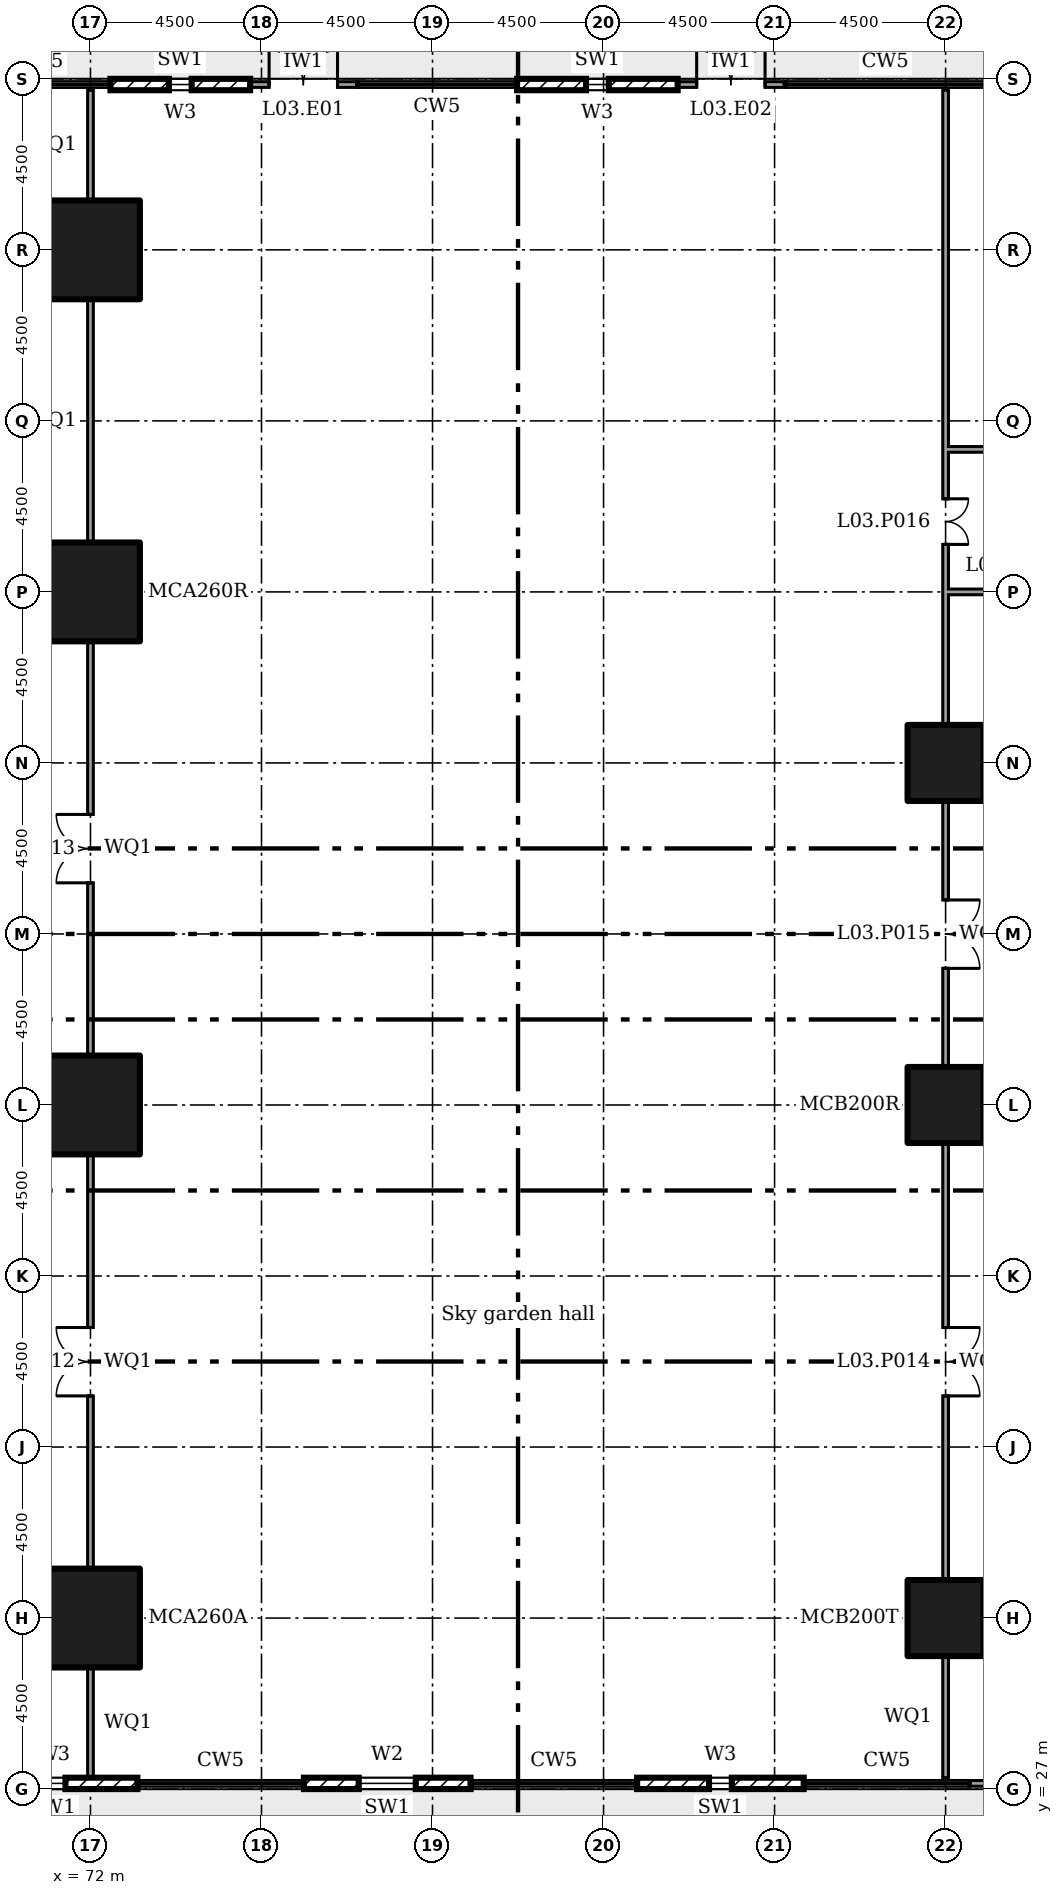
"""IFC4 building model, lengths in metres.
Left out: names, types, materials, properties, quantities, classifications, styles, units other than length and angle.
Written with IfcOpenShell. Run it as: python <this file> out.ifc"""

import sys

from ifc_helpers import new_model, si_unit, direction, frame, frame_2d, origin, origin_2d, place, context, subcontext, project, spatial, rectangle, extrude, element, fill, save


model = new_model("IFC4")
c1 = context("Model", 3, precision=1e-05, world=origin(), true_north=direction((0.0, 1.0)))
c2 = subcontext(c1, "Body", "Model", "MODEL_VIEW")
j1 = project(units=[si_unit("LENGTHUNIT", "METRE"), si_unit("PLANEANGLEUNIT", "RADIAN")], contexts=[c1])
p1 = place(None, origin())
s1 = spatial("IfcSite", under=j1, at=p1, CompositionType="ELEMENT")
p2 = place(p1, origin())
s2 = spatial("IfcBuilding", under=s1, at=p2, CompositionType="ELEMENT")
p3 = place(p2, frame((0.0, 0.0, 16.5)))
s3 = spatial("IfcBuildingStorey", under=s2, at=p3, CompositionType="ELEMENT", Elevation=16.5)
for number, where in (
    (1, (72.0, 31.5, 0.0)),
    (2, (72.0, 45.0, 0.0)),
    (3, (72.0, 58.5, 0.0)),
    (4, (72.0, 67.5, 0.0)),
):
    element("IfcColumn", number, at=place(p3, frame(where)), inside=s3, PredefinedType="COLUMN", context=c2, shape_type="SweptSolid", body=[
        extrude(rectangle(XDim=2.6, YDim=2.6, at=origin_2d()), origin(), (0.0, 0.0, 1.0), 4.5),
    ])
for number, where in (
    (5, (94.5, 31.5, 0.0)),
    (6, (94.5, 45.0, 0.0)),
    (7, (94.5, 54.0, 0.0)),
):
    element("IfcColumn", number, at=place(p3, frame(where)), inside=s3, PredefinedType="COLUMN", context=c2, shape_type="SweptSolid", body=[
        extrude(rectangle(XDim=2.0, YDim=2.0, at=origin_2d()), origin(), (0.0, 0.0, 1.0), 4.5),
    ])
p4 = place(p3, frame((68.8, 27.15, 0.0)))
e8 = element("IfcWall", 8, at=p4, inside=s3, PredefinedType="ELEMENTEDWALL", context=c2, shape_type="SweptSolid", body=[
    extrude(rectangle(XDim=4.433, YDim=0.3, at=frame_2d((2.217, 0.0))), origin(), (0.0, 0.0, 1.0), 4.05),
])
p5 = place(p4, frame((1.942, 0.0, 0.45)))
e9 = element("IfcOpeningElement", 9, at=p5, cuts=e8, PredefinedType="OPENING", context=c2, shape_type="SweptSolid", body=[
    extrude(rectangle(XDim=0.6, YDim=2.4, at=frame_2d((0.3, 1.2))), frame((0.0, 0.16, 0.0), z_axis=(0.0, -1.0, 0.0), x_axis=(1.0, 0.0, 0.0)), (0.0, 0.0, 1.0), 0.32),
])
p6 = place(p3, frame((77.617, 27.15, 0.0)))
e10 = element("IfcWall", 10, at=p6, inside=s3, PredefinedType="ELEMENTEDWALL", context=c2, shape_type="SweptSolid", body=[
    extrude(rectangle(XDim=4.383, YDim=0.3, at=frame_2d((2.192, 0.0))), origin(), (0.0, 0.0, 1.0), 4.05),
])
p7 = place(p6, frame((1.442, 0.0, 0.9)))
e11 = element("IfcOpeningElement", 11, at=p7, cuts=e10, PredefinedType="OPENING", context=c2, shape_type="SweptSolid", body=[
    extrude(rectangle(XDim=1.5, YDim=1.8, at=frame_2d((0.75, 0.9))), frame((0.0, 0.16, 0.0), z_axis=(0.0, -1.0, 0.0), x_axis=(1.0, 0.0, 0.0)), (0.0, 0.0, 1.0), 0.32),
])
p8 = place(p3, frame((86.383, 27.15, 0.0)))
e12 = element("IfcWall", 12, at=p8, inside=s3, PredefinedType="ELEMENTEDWALL", context=c2, shape_type="SweptSolid", body=[
    extrude(rectangle(XDim=4.383, YDim=0.3, at=frame_2d((2.192, 0.0))), origin(), (0.0, 0.0, 1.0), 4.05),
])
p9 = place(p8, frame((1.892, 0.0, 0.45)))
e13 = element("IfcOpeningElement", 13, at=p9, cuts=e12, PredefinedType="OPENING", context=c2, shape_type="SweptSolid", body=[
    extrude(rectangle(XDim=0.6, YDim=2.4, at=frame_2d((0.3, 1.2))), frame((0.0, 0.16, 0.0), z_axis=(0.0, -1.0, 0.0), x_axis=(1.0, 0.0, 0.0)), (0.0, 0.0, 1.0), 0.32),
])
p10 = place(p3, frame((95.15, 27.15, 0.0)))
e14 = element("IfcWall", 14, at=p10, inside=s3, PredefinedType="SOLIDWALL", context=c2, shape_type="SweptSolid", body=[
    extrude(rectangle(XDim=2.85, YDim=0.15, at=frame_2d((1.425, 0.0))), origin(), (0.0, 0.0, 1.0), 4.05),
])
p11 = place(p10, frame((0.5, 0.0, 0.0)))
e15 = element("IfcOpeningElement", 15, at=p11, cuts=e14, PredefinedType="OPENING", context=c2, shape_type="SweptSolid", body=[
    extrude(rectangle(XDim=1.8, YDim=2.4, at=frame_2d((0.9, 1.2))), frame((0.0, 0.085, 0.0), z_axis=(0.0, -1.0, 0.0), x_axis=(1.0, 0.0, 0.0)), (0.0, 0.0, 1.0), 0.17),
])
p12 = place(p3, frame((90.25, 71.85, 0.0), z_axis=(0.0, 0.0, 1.0), x_axis=(-1.0, 0.0, 0.0)))
e16 = element("IfcWall", 16, at=p12, inside=s3, PredefinedType="SOLIDWALL", context=c2, shape_type="SweptSolid", body=[
    extrude(rectangle(XDim=2.8, YDim=0.15, at=frame_2d((1.4, 0.0))), origin(), (0.0, 0.0, 1.0), 4.05),
])
p13 = place(p12, frame((0.5, 0.0, 0.0)))
e17 = element("IfcOpeningElement", 17, at=p13, cuts=e16, PredefinedType="OPENING", context=c2, shape_type="SweptSolid", body=[
    extrude(rectangle(XDim=1.8, YDim=2.4, at=frame_2d((0.9, 1.2))), frame((0.0, 0.085, 0.0), z_axis=(0.0, -1.0, 0.0), x_axis=(1.0, 0.0, 0.0)), (0.0, 0.0, 1.0), 0.17),
])
p14 = place(p3, frame((87.45, 71.85, 0.0), z_axis=(0.0, 0.0, 1.0), x_axis=(-1.0, 0.0, 0.0)))
e18 = element("IfcWall", 18, at=p14, inside=s3, PredefinedType="ELEMENTEDWALL", context=c2, shape_type="SweptSolid", body=[
    extrude(rectangle(XDim=4.225, YDim=0.3, at=frame_2d((2.112, 0.0))), origin(), (0.0, 0.0, 1.0), 4.05),
])
p15 = place(p14, frame((1.812, 0.0, 0.45)))
e19 = element("IfcOpeningElement", 19, at=p15, cuts=e18, PredefinedType="OPENING", context=c2, shape_type="SweptSolid", body=[
    extrude(rectangle(XDim=0.6, YDim=2.4, at=frame_2d((0.3, 1.2))), frame((0.0, 0.16, 0.0), z_axis=(0.0, -1.0, 0.0), x_axis=(1.0, 0.0, 0.0)), (0.0, 0.0, 1.0), 0.32),
])
p16 = place(p3, frame((79.0, 71.85, 0.0), z_axis=(0.0, 0.0, 1.0), x_axis=(-1.0, 0.0, 0.0)))
e20 = element("IfcWall", 20, at=p16, inside=s3, PredefinedType="SOLIDWALL", context=c2, shape_type="SweptSolid", body=[
    extrude(rectangle(XDim=2.8, YDim=0.15, at=frame_2d((1.4, 0.0))), origin(), (0.0, 0.0, 1.0), 4.05),
])
p17 = place(p16, frame((0.5, 0.0, 0.0)))
e21 = element("IfcOpeningElement", 21, at=p17, cuts=e20, PredefinedType="OPENING", context=c2, shape_type="SweptSolid", body=[
    extrude(rectangle(XDim=1.8, YDim=2.4, at=frame_2d((0.9, 1.2))), frame((0.0, 0.085, 0.0), z_axis=(0.0, -1.0, 0.0), x_axis=(1.0, 0.0, 0.0)), (0.0, 0.0, 1.0), 0.17),
])
p18 = place(p3, frame((76.2, 71.85, 0.0), z_axis=(0.0, 0.0, 1.0), x_axis=(-1.0, 0.0, 0.0)))
e22 = element("IfcWall", 22, at=p18, inside=s3, PredefinedType="ELEMENTEDWALL", context=c2, shape_type="SweptSolid", body=[
    extrude(rectangle(XDim=3.675, YDim=0.3, at=frame_2d((1.837, 0.0))), origin(), (0.0, 0.0, 1.0), 4.05),
])
p19 = place(p18, frame((1.538, 0.0, 0.45)))
e23 = element("IfcOpeningElement", 23, at=p19, cuts=e22, PredefinedType="OPENING", context=c2, shape_type="SweptSolid", body=[
    extrude(rectangle(XDim=0.6, YDim=2.4, at=frame_2d((0.3, 1.2))), frame((0.0, 0.16, 0.0), z_axis=(0.0, -1.0, 0.0), x_axis=(1.0, 0.0, 0.0)), (0.0, 0.0, 1.0), 0.32),
])
p20 = place(p3, frame((72.0, 27.3, 0.0), z_axis=(0.0, 0.0, 1.0), x_axis=(0.0, 1.0, 0.0)))
e24 = element("IfcWall", 24, at=p20, inside=s3, PredefinedType="PARTITIONING", context=c2, shape_type="SweptSolid", body=[
    extrude(rectangle(XDim=2.905, YDim=0.15, at=frame_2d((1.453, 0.0))), origin(), (0.0, 0.0, 1.0), 4.05),
])
p21 = place(p3, frame((72.0, 32.795, 0.0), z_axis=(0.0, 0.0, 1.0), x_axis=(0.0, 1.0, 0.0)))
e25 = element("IfcWall", 25, at=p21, inside=s3, PredefinedType="PARTITIONING", context=c2, shape_type="SweptSolid", body=[
    extrude(rectangle(XDim=10.91, YDim=0.15, at=frame_2d((5.455, 0.0))), origin(), (0.0, 0.0, 1.0), 2.25),
])
p22 = place(p21, frame((4.55, 0.0, 0.0)))
e26 = element("IfcOpeningElement", 26, at=p22, cuts=e25, PredefinedType="OPENING", context=c2, shape_type="SweptSolid", body=[
    extrude(rectangle(XDim=1.8, YDim=2.1, at=frame_2d((0.9, 1.05))), frame((0.0, 0.085, 0.0), z_axis=(0.0, -1.0, 0.0), x_axis=(1.0, 0.0, 0.0)), (0.0, 0.0, 1.0), 0.17),
])
p23 = place(p3, frame((72.0, 46.295, 0.0), z_axis=(0.0, 0.0, 1.0), x_axis=(0.0, 1.0, 0.0)))
e27 = element("IfcWall", 27, at=p23, inside=s3, PredefinedType="PARTITIONING", context=c2, shape_type="SweptSolid", body=[
    extrude(rectangle(XDim=10.91, YDim=0.15, at=frame_2d((5.455, 0.0))), origin(), (0.0, 0.0, 1.0), 2.25),
])
p24 = place(p23, frame((4.55, 0.0, 0.0)))
e28 = element("IfcOpeningElement", 28, at=p24, cuts=e27, PredefinedType="OPENING", context=c2, shape_type="SweptSolid", body=[
    extrude(rectangle(XDim=1.8, YDim=2.1, at=frame_2d((0.9, 1.05))), frame((0.0, 0.085, 0.0), z_axis=(0.0, -1.0, 0.0), x_axis=(1.0, 0.0, 0.0)), (0.0, 0.0, 1.0), 0.17),
])
p25 = place(p3, frame((72.0, 59.795, 0.0), z_axis=(0.0, 0.0, 1.0), x_axis=(0.0, 1.0, 0.0)))
e29 = element("IfcWall", 29, at=p25, inside=s3, PredefinedType="PARTITIONING", context=c2, shape_type="SweptSolid", body=[
    extrude(rectangle(XDim=6.41, YDim=0.15, at=frame_2d((3.205, 0.0))), origin(), (0.0, 0.0, 1.0), 2.25),
])
p26 = place(p3, frame((72.0, 68.795, 0.0), z_axis=(0.0, 0.0, 1.0), x_axis=(0.0, 1.0, 0.0)))
e30 = element("IfcWall", 30, at=p26, inside=s3, PredefinedType="PARTITIONING", context=c2, shape_type="SweptSolid", body=[
    extrude(rectangle(XDim=2.905, YDim=0.15, at=frame_2d((1.453, 0.0))), origin(), (0.0, 0.0, 1.0), 4.05),
])
p27 = place(p3, frame((94.5, 27.3, 0.0), z_axis=(0.0, 0.0, 1.0), x_axis=(0.0, 1.0, 0.0)))
e31 = element("IfcWall", 31, at=p27, inside=s3, PredefinedType="PARTITIONING", context=c2, shape_type="SweptSolid", body=[
    extrude(rectangle(XDim=3.205, YDim=0.15, at=frame_2d((1.603, 0.0))), origin(), (0.0, 0.0, 1.0), 4.05),
])
p28 = place(p3, frame((94.5, 32.495, 0.0), z_axis=(0.0, 0.0, 1.0), x_axis=(0.0, 1.0, 0.0)))
e32 = element("IfcWall", 32, at=p28, inside=s3, PredefinedType="PARTITIONING", context=c2, shape_type="SweptSolid", body=[
    extrude(rectangle(XDim=11.51, YDim=0.15, at=frame_2d((5.755, 0.0))), origin(), (0.0, 0.0, 1.0), 2.25),
])
p29 = place(p28, frame((4.85, 0.0, 0.0)))
e33 = element("IfcOpeningElement", 33, at=p29, cuts=e32, PredefinedType="OPENING", context=c2, shape_type="SweptSolid", body=[
    extrude(rectangle(XDim=1.8, YDim=2.1, at=frame_2d((0.9, 1.05))), frame((0.0, 0.085, 0.0), z_axis=(0.0, -1.0, 0.0), x_axis=(1.0, 0.0, 0.0)), (0.0, 0.0, 1.0), 0.17),
])
p30 = place(p3, frame((94.5, 45.995, 0.0), z_axis=(0.0, 0.0, 1.0), x_axis=(0.0, 1.0, 0.0)))
e34 = element("IfcWall", 34, at=p30, inside=s3, PredefinedType="PARTITIONING", context=c2, shape_type="SweptSolid", body=[
    extrude(rectangle(XDim=7.01, YDim=0.15, at=frame_2d((3.505, 0.0))), origin(), (0.0, 0.0, 1.0), 2.25),
])
p31 = place(p30, frame((2.6, 0.0, 0.0)))
e35 = element("IfcOpeningElement", 35, at=p31, cuts=e34, PredefinedType="OPENING", context=c2, shape_type="SweptSolid", body=[
    extrude(rectangle(XDim=1.8, YDim=2.1, at=frame_2d((0.9, 1.05))), frame((0.0, 0.085, 0.0), z_axis=(0.0, -1.0, 0.0), x_axis=(1.0, 0.0, 0.0)), (0.0, 0.0, 1.0), 0.17),
])
p32 = place(p3, frame((94.5, 54.995, 0.0), z_axis=(0.0, 0.0, 1.0), x_axis=(0.0, 1.0, 0.0)))
e36 = element("IfcWall", 36, at=p32, inside=s3, PredefinedType="PARTITIONING", context=c2, shape_type="SweptSolid", body=[
    extrude(rectangle(XDim=3.58, YDim=0.15, at=frame_2d((1.79, 0.0))), origin(), (0.0, 0.0, 1.0), 4.05),
])
p33 = place(p3, frame((94.5, 58.5, 0.0), z_axis=(0.0, 0.0, 1.0), x_axis=(0.0, 1.0, 0.0)))
e37 = element("IfcWall", 37, at=p33, inside=s3, PredefinedType="PARTITIONING", context=c2, shape_type="SweptSolid", body=[
    extrude(rectangle(XDim=3.825, YDim=0.15, at=frame_2d((1.913, 0.0))), origin(), (0.0, 0.0, 1.0), 4.05),
])
p34 = place(p33, frame((1.25, 0.0, 0.0)))
e38 = element("IfcOpeningElement", 38, at=p34, cuts=e37, PredefinedType="OPENING", context=c2, shape_type="SweptSolid", body=[
    extrude(rectangle(XDim=1.2, YDim=2.1, at=frame_2d((0.6, 1.05))), frame((0.0, 0.085, 0.0), z_axis=(0.0, -1.0, 0.0), x_axis=(1.0, 0.0, 0.0)), (0.0, 0.0, 1.0), 0.17),
])
p35 = place(p3, frame((94.5, 62.25, 0.0), z_axis=(0.0, 0.0, 1.0), x_axis=(0.0, 1.0, 0.0)))
e39 = element("IfcWall", 39, at=p35, inside=s3, PredefinedType="PARTITIONING", context=c2, shape_type="SweptSolid", body=[
    extrude(rectangle(XDim=9.45, YDim=0.15, at=frame_2d((4.725, 0.0))), origin(), (0.0, 0.0, 1.0), 4.05),
])
p36 = place(p3, frame((94.575, 58.5, 0.0)))
e40 = element("IfcWall", 40, at=p36, inside=s3, PredefinedType="PARTITIONING", context=c2, shape_type="SweptSolid", body=[
    extrude(rectangle(XDim=3.43, YDim=0.15, at=frame_2d((1.715, 0.0))), origin(), (0.0, 0.0, 1.0), 4.05),
])
p37 = place(p36, frame((1.075, 0.0, 0.0)))
e41 = element("IfcOpeningElement", 41, at=p37, cuts=e40, PredefinedType="OPENING", context=c2, shape_type="SweptSolid", body=[
    extrude(rectangle(XDim=1.2, YDim=2.1, at=frame_2d((0.6, 1.05))), frame((0.0, 0.085, 0.0), z_axis=(0.0, -1.0, 0.0), x_axis=(1.0, 0.0, 0.0)), (0.0, 0.0, 1.0), 0.17),
])
p38 = place(p3, frame((94.575, 62.25, 0.0)))
e42 = element("IfcWall", 42, at=p38, inside=s3, PredefinedType="PARTITIONING", context=c2, shape_type="SweptSolid", body=[
    extrude(rectangle(XDim=10.325, YDim=0.15, at=frame_2d((5.163, 0.0))), origin(), (0.0, 0.0, 1.0), 4.05),
])
p39 = place(p5, origin())
e43 = element("IfcWindow", 43, at=p39, inside=s3, PartitioningType="SINGLE_PANEL", PredefinedType="WINDOW", context=c2, shape_type="SweptSolid", body=[
    extrude(rectangle(XDim=0.6, YDim=2.4, at=frame_2d((0.3, 1.2))), frame((0.0, 0.03, 0.0), z_axis=(0.0, -1.0, 0.0), x_axis=(1.0, 0.0, 0.0)), (0.0, 0.0, 1.0), 0.06),
])
fill(e9, e43)
p40 = place(p7, origin())
e44 = element("IfcWindow", 44, at=p40, inside=s3, PartitioningType="SINGLE_PANEL", PredefinedType="WINDOW", context=c2, shape_type="SweptSolid", body=[
    extrude(rectangle(XDim=1.5, YDim=1.8, at=frame_2d((0.75, 0.9))), frame((0.0, 0.03, 0.0), z_axis=(0.0, -1.0, 0.0), x_axis=(1.0, 0.0, 0.0)), (0.0, 0.0, 1.0), 0.06),
])
fill(e11, e44)
p41 = place(p9, origin())
e45 = element("IfcWindow", 45, at=p41, inside=s3, PartitioningType="SINGLE_PANEL", PredefinedType="WINDOW", context=c2, shape_type="SweptSolid", body=[
    extrude(rectangle(XDim=0.6, YDim=2.4, at=frame_2d((0.3, 1.2))), frame((0.0, 0.03, 0.0), z_axis=(0.0, -1.0, 0.0), x_axis=(1.0, 0.0, 0.0)), (0.0, 0.0, 1.0), 0.06),
])
fill(e13, e45)
p42 = place(p13, frame((1.8, 0.0, 0.0), x_axis=(-1.0, 0.0, 0.0)))
e46 = element("IfcDoor", 46, at=p42, inside=s3, OperationType="DOUBLE_DOOR_DOUBLE_SWING", PredefinedType="NOTDEFINED", context=c2, shape_type="SweptSolid", body=[
    extrude(rectangle(XDim=1.8, YDim=2.4, at=frame_2d((0.9, 1.2))), frame((0.0, 0.025, 0.0), z_axis=(0.0, -1.0, 0.0), x_axis=(1.0, 0.0, 0.0)), (0.0, 0.0, 1.0), 0.05),
])
fill(e17, e46)
p43 = place(p15, origin())
e47 = element("IfcWindow", 47, at=p43, inside=s3, PartitioningType="SINGLE_PANEL", PredefinedType="WINDOW", context=c2, shape_type="SweptSolid", body=[
    extrude(rectangle(XDim=0.6, YDim=2.4, at=frame_2d((0.3, 1.2))), frame((0.0, 0.03, 0.0), z_axis=(0.0, -1.0, 0.0), x_axis=(1.0, 0.0, 0.0)), (0.0, 0.0, 1.0), 0.06),
])
fill(e19, e47)
p44 = place(p17, frame((1.8, 0.0, 0.0), x_axis=(-1.0, 0.0, 0.0)))
e48 = element("IfcDoor", 48, at=p44, inside=s3, OperationType="DOUBLE_DOOR_DOUBLE_SWING", PredefinedType="NOTDEFINED", context=c2, shape_type="SweptSolid", body=[
    extrude(rectangle(XDim=1.8, YDim=2.4, at=frame_2d((0.9, 1.2))), frame((0.0, 0.025, 0.0), z_axis=(0.0, -1.0, 0.0), x_axis=(1.0, 0.0, 0.0)), (0.0, 0.0, 1.0), 0.05),
])
fill(e21, e48)
p45 = place(p19, origin())
e49 = element("IfcWindow", 49, at=p45, inside=s3, PartitioningType="SINGLE_PANEL", PredefinedType="WINDOW", context=c2, shape_type="SweptSolid", body=[
    extrude(rectangle(XDim=0.6, YDim=2.4, at=frame_2d((0.3, 1.2))), frame((0.0, 0.03, 0.0), z_axis=(0.0, -1.0, 0.0), x_axis=(1.0, 0.0, 0.0)), (0.0, 0.0, 1.0), 0.06),
])
fill(e23, e49)
p46 = place(p22, origin())
e50 = element("IfcDoor", 50, at=p46, inside=s3, OperationType="DOUBLE_DOOR_SINGLE_SWING", PredefinedType="DOOR", context=c2, shape_type="SweptSolid", body=[
    extrude(rectangle(XDim=1.8, YDim=2.1, at=frame_2d((0.9, 1.05))), frame((0.0, 0.025, 0.0), z_axis=(0.0, -1.0, 0.0), x_axis=(1.0, 0.0, 0.0)), (0.0, 0.0, 1.0), 0.05),
])
fill(e26, e50)
p47 = place(p24, origin())
e51 = element("IfcDoor", 51, at=p47, inside=s3, OperationType="DOUBLE_DOOR_SINGLE_SWING", PredefinedType="DOOR", context=c2, shape_type="SweptSolid", body=[
    extrude(rectangle(XDim=1.8, YDim=2.1, at=frame_2d((0.9, 1.05))), frame((0.0, 0.025, 0.0), z_axis=(0.0, -1.0, 0.0), x_axis=(1.0, 0.0, 0.0)), (0.0, 0.0, 1.0), 0.05),
])
fill(e28, e51)
p48 = place(p29, frame((1.8, 0.0, 0.0), x_axis=(-1.0, 0.0, 0.0)))
e52 = element("IfcDoor", 52, at=p48, inside=s3, OperationType="DOUBLE_DOOR_SINGLE_SWING", PredefinedType="DOOR", context=c2, shape_type="SweptSolid", body=[
    extrude(rectangle(XDim=1.8, YDim=2.1, at=frame_2d((0.9, 1.05))), frame((0.0, 0.025, 0.0), z_axis=(0.0, -1.0, 0.0), x_axis=(1.0, 0.0, 0.0)), (0.0, 0.0, 1.0), 0.05),
])
fill(e33, e52)
p49 = place(p31, frame((1.8, 0.0, 0.0), x_axis=(-1.0, 0.0, 0.0)))
e53 = element("IfcDoor", 53, at=p49, inside=s3, OperationType="DOUBLE_DOOR_SINGLE_SWING", PredefinedType="DOOR", context=c2, shape_type="SweptSolid", body=[
    extrude(rectangle(XDim=1.8, YDim=2.1, at=frame_2d((0.9, 1.05))), frame((0.0, 0.025, 0.0), z_axis=(0.0, -1.0, 0.0), x_axis=(1.0, 0.0, 0.0)), (0.0, 0.0, 1.0), 0.05),
])
fill(e35, e53)
p50 = place(p34, frame((1.2, 0.0, 0.0), x_axis=(-1.0, 0.0, 0.0)))
e54 = element("IfcDoor", 54, at=p50, inside=s3, OperationType="DOUBLE_DOOR_SINGLE_SWING", PredefinedType="DOOR", context=c2, shape_type="SweptSolid", body=[
    extrude(rectangle(XDim=1.2, YDim=2.1, at=frame_2d((0.6, 1.05))), frame((0.0, 0.025, 0.0), z_axis=(0.0, -1.0, 0.0), x_axis=(1.0, 0.0, 0.0)), (0.0, 0.0, 1.0), 0.05),
])
fill(e38, e54)
save(model, sys.argv[1])
